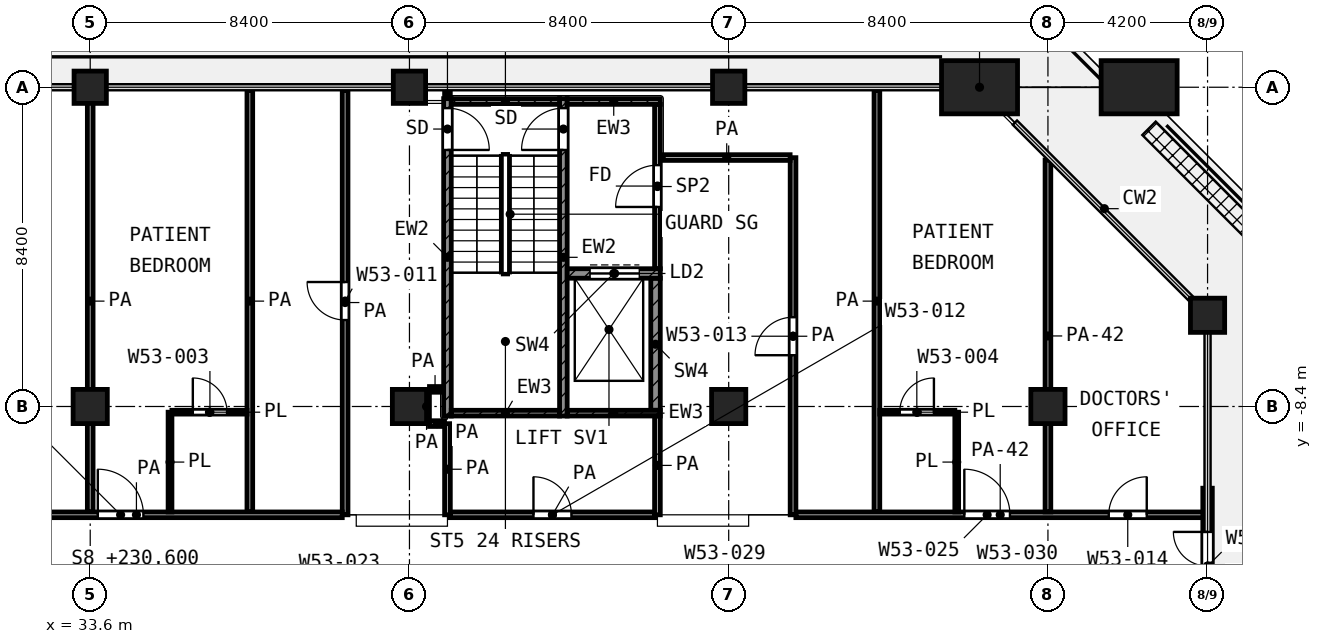
"""IFC4 building model, lengths in metres.
Left out: names, types, materials, properties, quantities, classifications, styles, units other than length and angle.
Written with IfcOpenShell. Run it as: python <this file> out.ifc"""

import sys

from ifc_helpers import new_model, si_unit, direction, frame, frame_2d, origin, origin_2d, place, context, subcontext, project, spatial, rectangle, extrude, element, fill, save


model = new_model("IFC4")
c1 = context("Model", 3, precision=1e-05, world=origin(), true_north=direction((0.0, 1.0)))
c2 = subcontext(c1, "Body", "Model", "MODEL_VIEW")
j1 = project(units=[si_unit("LENGTHUNIT", "METRE"), si_unit("PLANEANGLEUNIT", "RADIAN")], contexts=[c1])
p1 = place(None, origin())
s1 = spatial("IfcSite", under=j1, at=p1, CompositionType="ELEMENT")
p2 = place(p1, origin())
s2 = spatial("IfcBuilding", under=s1, at=p2, CompositionType="ELEMENT")
p3 = place(p2, frame((0.0, 0.0, 230.6)))
s3 = spatial("IfcBuildingStorey", under=s2, at=p3, CompositionType="ELEMENT", Elevation=230.6)
for number, where, z_axis, x_axis in (
    (1, (33.6, 0.0, 0.0), (0.0, 0.0, 1.0), (1.0, 0.0, 0.0)),
    (2, (42.0, 0.0, 0.0), (0.0, 0.0, 1.0), (1.0, 0.0, 0.0)),
    (3, (50.4, 0.0, 0.0), (0.0, 0.0, 1.0), (1.0, 0.0, 0.0)),
):
    element("IfcColumn", number, at=place(p3, frame(where, z_axis=z_axis, x_axis=x_axis)), inside=s3, PredefinedType="COLUMN", context=c2, shape_type="SweptSolid", body=[
        extrude(rectangle(XDim=0.85, YDim=0.85, at=origin_2d()), origin(), (0.0, 0.0, 1.0), 4.2),
    ])
p4 = place(p3, frame((57.0, 0.0, 0.0), z_axis=(0.0, 0.0, 1.0), x_axis=(1.0, 0.0, 0.0)))
e4 = element("IfcColumn", 4, at=p4, inside=s3, PredefinedType="COLUMN", context=c2, shape_type="SweptSolid", body=[
    extrude(rectangle(XDim=2.0, YDim=1.4, at=origin_2d()), origin(), (0.0, 0.0, 1.0), 4.2),
])
for number, where, z_axis, x_axis in (
    (5, (63.0, -6.0, 0.0), (0.0, 0.0, 1.0), (1.0, 0.0, 0.0)),
    (6, (33.6, -8.4, 0.0), (0.0, 0.0, 1.0), (1.0, 0.0, 0.0)),
    (7, (42.0, -8.4, 0.0), (0.0, 0.0, 1.0), (1.0, 0.0, 0.0)),
    (8, (50.4, -8.4, 0.0), (0.0, 0.0, 1.0), (1.0, 0.0, 0.0)),
    (9, (58.8, -8.4, 0.0), (0.0, 0.0, 1.0), (1.0, 0.0, 0.0)),
):
    element("IfcColumn", number, at=place(p3, frame(where, z_axis=z_axis, x_axis=x_axis)), inside=s3, PredefinedType="COLUMN", context=c2, shape_type="SweptSolid", body=[
        extrude(rectangle(XDim=0.9, YDim=0.9, at=origin_2d()), origin(), (0.0, 0.0, 1.0), 4.2),
    ])
p5 = place(p3, frame((61.2, 0.0, 0.0), z_axis=(0.0, 0.0, 1.0), x_axis=(1.0, 0.0, 0.0)))
e10 = element("IfcColumn", 10, at=p5, inside=s3, PredefinedType="COLUMN", context=c2, shape_type="SweptSolid", body=[
    extrude(rectangle(XDim=2.0, YDim=1.4, at=origin_2d()), origin(), (0.0, 0.0, 1.0), 4.2),
])
p6 = place(p3, frame((63.0, -14.65, 0.0), z_axis=(0.0, 0.0, 1.0), x_axis=(0.0, 1.0, 0.0)))
e11 = element("IfcWall", 11, at=p6, inside=s3, PredefinedType="SOLIDWALL", context=c2, shape_type="SweptSolid", body=[
    extrude(rectangle(XDim=4.1, YDim=0.25, at=frame_2d((2.05, 0.0))), origin(), (0.0, 0.0, 1.0), 2.58),
])
p7 = place(p6, frame((1.15, 0.0, 0.0)))
e12 = element("IfcOpeningElement", 12, at=p7, cuts=e11, PredefinedType="OPENING", context=c2, shape_type="SweptSolid", body=[
    extrude(rectangle(XDim=1.8, YDim=2.1, at=frame_2d((0.9, 1.05))), frame((0.0, 0.135, 0.0), z_axis=(0.0, -1.0, 0.0), x_axis=(1.0, 0.0, 0.0)), (0.0, 0.0, 1.0), 0.27),
])
p8 = place(p3, frame((43.0, -8.65, 0.0), z_axis=(0.0, 0.0, 1.0), x_axis=(0.0, 1.0, 0.0)))
e13 = element("IfcWall", 13, at=p8, inside=s3, PredefinedType="SHEAR", context=c2, shape_type="SweptSolid", body=[
    extrude(rectangle(XDim=8.35, YDim=0.2, at=frame_2d((4.175, 0.0))), origin(), (0.0, 0.0, 1.0), 3.6),
])
p9 = place(p8, frame((7.0, 0.0, 0.0)))
e14 = element("IfcOpeningElement", 14, at=p9, cuts=e13, PredefinedType="OPENING", context=c2, shape_type="SweptSolid", body=[
    extrude(rectangle(XDim=1.1, YDim=2.1, at=frame_2d((0.55, 1.05))), frame((0.0, 0.11, 0.0), z_axis=(0.0, -1.0, 0.0), x_axis=(1.0, 0.0, 0.0)), (0.0, 0.0, 1.0), 0.22),
])
p10 = place(p3, frame((46.05, -8.65, 0.0), z_axis=(0.0, 0.0, 1.0), x_axis=(0.0, 1.0, 0.0)))
e15 = element("IfcWall", 15, at=p10, inside=s3, PredefinedType="SHEAR", context=c2, shape_type="SweptSolid", body=[
    extrude(rectangle(XDim=8.35, YDim=0.2, at=frame_2d((4.175, 0.0))), origin(), (0.0, 0.0, 1.0), 3.6),
])
p11 = place(p10, frame((7.0, 0.0, 0.0)))
e16 = element("IfcOpeningElement", 16, at=p11, cuts=e15, PredefinedType="OPENING", context=c2, shape_type="SweptSolid", body=[
    extrude(rectangle(XDim=1.1, YDim=2.1, at=frame_2d((0.55, 1.05))), frame((0.0, 0.11, 0.0), z_axis=(0.0, -1.0, 0.0), x_axis=(1.0, 0.0, 0.0)), (0.0, 0.0, 1.0), 0.22),
])
p12 = place(p3, frame((43.1, -0.375, 0.0), z_axis=(0.0, 0.0, 1.0), x_axis=(1.0, 0.0, 0.0)))
e17 = element("IfcWall", 17, at=p12, inside=s3, PredefinedType="SHEAR", context=c2, shape_type="SweptSolid", body=[
    extrude(rectangle(XDim=2.85, YDim=0.15, at=frame_2d((1.425, 0.0))), origin(), (0.0, 0.0, 1.0), 3.6),
])
p13 = place(p3, frame((46.15, -0.375, 0.0), z_axis=(0.0, 0.0, 1.0), x_axis=(1.0, 0.0, 0.0)))
e18 = element("IfcWall", 18, at=p13, inside=s3, PredefinedType="SHEAR", context=c2, shape_type="SweptSolid", body=[
    extrude(rectangle(XDim=2.45, YDim=0.15, at=frame_2d((1.225, 0.0))), origin(), (0.0, 0.0, 1.0), 3.6),
])
p14 = place(p3, frame((43.1, -8.575, 0.0), z_axis=(0.0, 0.0, 1.0), x_axis=(1.0, 0.0, 0.0)))
e19 = element("IfcWall", 19, at=p14, inside=s3, PredefinedType="SHEAR", context=c2, shape_type="SweptSolid", body=[
    extrude(rectangle(XDim=2.85, YDim=0.15, at=frame_2d((1.425, 0.0))), origin(), (0.0, 0.0, 1.0), 3.6),
])
p15 = place(p3, frame((46.15, -8.575, 0.0), z_axis=(0.0, 0.0, 1.0), x_axis=(1.0, 0.0, 0.0)))
e20 = element("IfcWall", 20, at=p15, inside=s3, PredefinedType="SHEAR", context=c2, shape_type="SweptSolid", body=[
    extrude(rectangle(XDim=2.45, YDim=0.15, at=frame_2d((1.225, 0.0))), origin(), (0.0, 0.0, 1.0), 3.6),
])
p16 = place(p3, frame((46.15, -4.9, 0.0), z_axis=(0.0, 0.0, 1.0), x_axis=(1.0, 0.0, 0.0)))
e21 = element("IfcWall", 21, at=p16, inside=s3, PredefinedType="SHEAR", context=c2, shape_type="SweptSolid", body=[
    extrude(rectangle(XDim=2.45, YDim=0.25, at=frame_2d((1.225, 0.0))), origin(), (0.0, 0.0, 1.0), 3.6),
])
p17 = place(p16, frame((0.6, 0.0, 0.0)))
e22 = element("IfcOpeningElement", 22, at=p17, cuts=e21, PredefinedType="OPENING", context=c2, shape_type="SweptSolid", body=[
    extrude(rectangle(XDim=1.3, YDim=2.1, at=frame_2d((0.65, 1.05))), frame((0.0, 0.135, 0.0), z_axis=(0.0, -1.0, 0.0), x_axis=(1.0, 0.0, 0.0)), (0.0, 0.0, 1.0), 0.27),
])
p18 = place(p3, frame((48.475, -8.5, 0.0), z_axis=(0.0, 0.0, 1.0), x_axis=(0.0, 1.0, 0.0)))
e23 = element("IfcWall", 23, at=p18, inside=s3, PredefinedType="SHEAR", context=c2, shape_type="SweptSolid", body=[
    extrude(rectangle(XDim=3.475, YDim=0.25, at=frame_2d((1.738, 0.0))), origin(), (0.0, 0.0, 1.0), 3.6),
])
p19 = place(p3, frame((48.525, -4.775, 0.0), z_axis=(0.0, 0.0, 1.0), x_axis=(0.0, 1.0, 0.0)))
e24 = element("IfcWall", 24, at=p19, inside=s3, PredefinedType="PARTITIONING", context=c2, shape_type="SweptSolid", body=[
    extrude(rectangle(XDim=4.325, YDim=0.15, at=frame_2d((2.163, 0.0))), origin(), (0.0, 0.0, 1.0), 3.6),
])
p20 = place(p19, frame((1.625, 0.0, 0.0)))
e25 = element("IfcOpeningElement", 25, at=p20, cuts=e24, PredefinedType="OPENING", context=c2, shape_type="SweptSolid", body=[
    extrude(rectangle(XDim=1.1, YDim=2.1, at=frame_2d((0.55, 1.05))), frame((0.0, 0.085, 0.0), z_axis=(0.0, -1.0, 0.0), x_axis=(1.0, 0.0, 0.0)), (0.0, 0.0, 1.0), 0.17),
])
p21 = place(p3, frame((35.75, -8.55, 0.0), z_axis=(0.0, 0.0, 1.0), x_axis=(1.0, 0.0, 0.0)))
e26 = element("IfcWall", 26, at=p21, inside=s3, PredefinedType="PARTITIONING", context=c2, shape_type="SweptSolid", body=[
    extrude(rectangle(XDim=1.975, YDim=0.1, at=frame_2d((0.988, 0.0))), origin(), (0.0, 0.0, 1.0), 3.6),
])
p22 = place(p21, frame((0.55, 0.0, 0.0)))
e27 = element("IfcOpeningElement", 27, at=p22, cuts=e26, PredefinedType="OPENING", context=c2, shape_type="SweptSolid", body=[
    extrude(rectangle(XDim=0.9, YDim=2.1, at=frame_2d((0.45, 1.05))), frame((0.0, 0.06, 0.0), z_axis=(0.0, -1.0, 0.0), x_axis=(1.0, 0.0, 0.0)), (0.0, 0.0, 1.0), 0.12),
])
p23 = place(p3, frame((54.375, -8.55, 0.0), z_axis=(0.0, 0.0, 1.0), x_axis=(1.0, 0.0, 0.0)))
e28 = element("IfcWall", 28, at=p23, inside=s3, PredefinedType="PARTITIONING", context=c2, shape_type="SweptSolid", body=[
    extrude(rectangle(XDim=1.975, YDim=0.1, at=frame_2d((0.988, 0.0))), origin(), (0.0, 0.0, 1.0), 3.6),
])
p24 = place(p23, frame((0.525, 0.0, 0.0)))
e29 = element("IfcOpeningElement", 29, at=p24, cuts=e28, PredefinedType="OPENING", context=c2, shape_type="SweptSolid", body=[
    extrude(rectangle(XDim=0.9, YDim=2.1, at=frame_2d((0.45, 1.05))), frame((0.0, 0.06, 0.0), z_axis=(0.0, -1.0, 0.0), x_axis=(1.0, 0.0, 0.0)), (0.0, 0.0, 1.0), 0.12),
])
for number, where, z_axis, x_axis in (
    (30, (35.7, -11.175, 0.0), (0.0, 0.0, 1.0), (0.0, 1.0, 0.0)),
    (31, (56.4, -11.175, 0.0), (0.0, 0.0, 1.0), (0.0, 1.0, 0.0)),
):
    element("IfcWall", number, at=place(p3, frame(where, z_axis=z_axis, x_axis=x_axis)), inside=s3, PredefinedType="PARTITIONING", context=c2, shape_type="SweptSolid", body=[
        extrude(rectangle(XDim=2.625, YDim=0.1, at=frame_2d((1.312, 0.0))), origin(), (0.0, 0.0, 1.0), 3.6),
    ])
p25 = place(p3, frame((29.4, -11.25, 0.0), z_axis=(0.0, 0.0, 1.0), x_axis=(1.0, 0.0, 0.0)))
e32 = element("IfcWall", 32, at=p25, inside=s3, PredefinedType="PARTITIONING", context=c2, shape_type="SweptSolid", body=[
    extrude(rectangle(XDim=10.832, YDim=0.15, at=frame_2d((5.416, 0.0))), origin(), (0.0, 0.0, 1.0), 3.6),
])
p26 = place(p25, frame((4.4, 0.0, 0.0)))
e33 = element("IfcOpeningElement", 33, at=p26, cuts=e32, PredefinedType="OPENING", context=c2, shape_type="SweptSolid", body=[
    extrude(rectangle(XDim=1.2, YDim=2.1, at=frame_2d((0.6, 1.05))), frame((0.0, 0.085, 0.0), z_axis=(0.0, -1.0, 0.0), x_axis=(1.0, 0.0, 0.0)), (0.0, 0.0, 1.0), 0.17),
])
p27 = place(p25, frame((1.5, 0.0, 0.0)))
e34 = element("IfcOpeningElement", 34, at=p27, cuts=e32, PredefinedType="OPENING", context=c2, shape_type="SweptSolid", body=[
    extrude(rectangle(XDim=1.2, YDim=2.1, at=frame_2d((0.6, 1.05))), frame((0.0, 0.085, 0.0), z_axis=(0.0, -1.0, 0.0), x_axis=(1.0, 0.0, 0.0)), (0.0, 0.0, 1.0), 0.17),
])
p28 = place(p3, frame((43.075, -11.25, 0.0), z_axis=(0.0, 0.0, 1.0), x_axis=(1.0, 0.0, 0.0)))
e35 = element("IfcWall", 35, at=p28, inside=s3, PredefinedType="PARTITIONING", context=c2, shape_type="SweptSolid", body=[
    extrude(rectangle(XDim=5.375, YDim=0.15, at=frame_2d((2.688, 0.0))), origin(), (0.0, 0.0, 1.0), 3.6),
])
p29 = place(p28, frame((2.188, 0.0, 0.0)))
e36 = element("IfcOpeningElement", 36, at=p29, cuts=e35, PredefinedType="OPENING", context=c2, shape_type="SweptSolid", body=[
    extrude(rectangle(XDim=1.0, YDim=2.1, at=frame_2d((0.5, 1.05))), frame((0.0, 0.085, 0.0), z_axis=(0.0, -1.0, 0.0), x_axis=(1.0, 0.0, 0.0)), (0.0, 0.0, 1.0), 0.17),
])
p30 = place(p3, frame((52.168, -11.25, 0.0), z_axis=(0.0, 0.0, 1.0), x_axis=(1.0, 0.0, 0.0)))
e37 = element("IfcWall", 37, at=p30, inside=s3, PredefinedType="PARTITIONING", context=c2, shape_type="SweptSolid", body=[
    extrude(rectangle(XDim=10.752, YDim=0.15, at=frame_2d((5.376, 0.0))), origin(), (0.0, 0.0, 1.0), 2.7),
])
p31 = place(p30, frame((4.432, 0.0, 0.0)))
e38 = element("IfcOpeningElement", 38, at=p31, cuts=e37, PredefinedType="OPENING", context=c2, shape_type="SweptSolid", body=[
    extrude(rectangle(XDim=1.2, YDim=2.1, at=frame_2d((0.6, 1.05))), frame((0.0, 0.085, 0.0), z_axis=(0.0, -1.0, 0.0), x_axis=(1.0, 0.0, 0.0)), (0.0, 0.0, 1.0), 0.17),
])
p32 = place(p30, frame((8.232, 0.0, 0.0)))
e39 = element("IfcOpeningElement", 39, at=p32, cuts=e37, PredefinedType="OPENING", context=c2, shape_type="SweptSolid", body=[
    extrude(rectangle(XDim=1.0, YDim=2.1, at=frame_2d((0.5, 1.05))), frame((0.0, 0.085, 0.0), z_axis=(0.0, -1.0, 0.0), x_axis=(1.0, 0.0, 0.0)), (0.0, 0.0, 1.0), 0.17),
])
p33 = place(p3, frame((42.527, -8.85, 0.0), z_axis=(0.0, 0.0, 1.0), x_axis=(1.0, 0.0, 0.0)))
e40 = element("IfcWall", 40, at=p33, inside=s3, PredefinedType="PARTITIONING", context=c2, shape_type="SweptSolid", body=[
    extrude(rectangle(XDim=0.396, YDim=0.15, at=frame_2d((0.198, 0.0))), origin(), (0.0, 0.0, 1.0), 3.6),
])
p34 = place(p3, frame((42.527, -7.95, 0.0), z_axis=(0.0, 0.0, 1.0), x_axis=(1.0, 0.0, 0.0)))
e41 = element("IfcWall", 41, at=p34, inside=s3, PredefinedType="PARTITIONING", context=c2, shape_type="SweptSolid", body=[
    extrude(rectangle(XDim=0.293, YDim=0.15, at=frame_2d((0.146, 0.0))), origin(), (0.0, 0.0, 1.0), 3.6),
])
p35 = place(p3, frame((48.68, -1.85, 0.0), z_axis=(0.0, 0.0, 1.0), x_axis=(1.0, 0.0, 0.0)))
e42 = element("IfcWall", 42, at=p35, inside=s3, PredefinedType="PARTITIONING", context=c2, shape_type="SweptSolid", body=[
    extrude(rectangle(XDim=3.336, YDim=0.15, at=frame_2d((1.668, 0.0))), origin(), (0.0, 0.0, 1.0), 3.6),
])
for number, where, z_axis, x_axis in (
    (43, (33.6, -11.175, 0.0), (0.0, 0.0, 1.0), (0.0, 1.0, 0.0)),
    (44, (37.8, -11.175, 0.0), (0.0, 0.0, 1.0), (0.0, 1.0, 0.0)),
):
    element("IfcWall", number, at=place(p3, frame(where, z_axis=z_axis, x_axis=x_axis)), inside=s3, PredefinedType="PARTITIONING", context=c2, shape_type="SweptSolid", body=[
        extrude(rectangle(XDim=11.095, YDim=0.15, at=frame_2d((5.547, 0.0))), origin(), (0.0, 0.0, 1.0), 3.6),
    ])
p36 = place(p3, frame((40.307, -11.25, 0.0), z_axis=(0.0, 0.0, 1.0), x_axis=(0.0, 1.0, 0.0)))
e45 = element("IfcWall", 45, at=p36, inside=s3, PredefinedType="PARTITIONING", context=c2, shape_type="SweptSolid", body=[
    extrude(rectangle(XDim=11.17, YDim=0.15, at=frame_2d((5.585, 0.0))), origin(), (0.0, 0.0, 1.0), 3.6),
])
p37 = place(p36, frame((5.125, 0.0, 0.0)))
e46 = element("IfcOpeningElement", 46, at=p37, cuts=e45, PredefinedType="OPENING", context=c2, shape_type="SweptSolid", body=[
    extrude(rectangle(XDim=1.0, YDim=2.1, at=frame_2d((0.5, 1.05))), frame((0.0, 0.085, 0.0), z_axis=(0.0, -1.0, 0.0), x_axis=(1.0, 0.0, 0.0)), (0.0, 0.0, 1.0), 0.17),
])
p38 = place(p3, frame((42.45, -8.849, 0.0), z_axis=(0.0, 0.0, 1.0), x_axis=(0.0, 1.0, 0.0)))
e47 = element("IfcWall", 47, at=p38, inside=s3, PredefinedType="PARTITIONING", context=c2, shape_type="SweptSolid", body=[
    extrude(rectangle(XDim=0.897, YDim=0.15, at=frame_2d((0.449, 0.0))), origin(), (0.0, 0.0, 1.0), 3.6),
])
p39 = place(p3, frame((43.0, -11.25, 0.0), z_axis=(0.0, 0.0, 1.0), x_axis=(0.0, 1.0, 0.0)))
e48 = element("IfcWall", 48, at=p39, inside=s3, PredefinedType="PARTITIONING", context=c2, shape_type="SweptSolid", body=[
    extrude(rectangle(XDim=2.398, YDim=0.15, at=frame_2d((1.199, 0.0))), origin(), (0.0, 0.0, 1.0), 3.6),
])
p40 = place(p3, frame((43.0, -0.27, 0.0), z_axis=(0.0, 0.0, 1.0), x_axis=(0.0, 1.0, 0.0)))
e49 = element("IfcWall", 49, at=p40, inside=s3, PredefinedType="PARTITIONING", context=c2, shape_type="SweptSolid", body=[
    extrude(rectangle(XDim=0.19, YDim=0.15, at=frame_2d((0.095, 0.0))), origin(), (0.0, 0.0, 1.0), 3.6),
])
p41 = place(p3, frame((48.525, -11.25, 0.0), z_axis=(0.0, 0.0, 1.0), x_axis=(0.0, 1.0, 0.0)))
e50 = element("IfcWall", 50, at=p41, inside=s3, PredefinedType="PARTITIONING", context=c2, shape_type="SweptSolid", body=[
    extrude(rectangle(XDim=2.6, YDim=0.15, at=frame_2d((1.3, 0.0))), origin(), (0.0, 0.0, 1.0), 3.6),
])
p42 = place(p3, frame((52.093, -11.25, 0.0), z_axis=(0.0, 0.0, 1.0), x_axis=(0.0, 1.0, 0.0)))
e51 = element("IfcWall", 51, at=p42, inside=s3, PredefinedType="PARTITIONING", context=c2, shape_type="SweptSolid", body=[
    extrude(rectangle(XDim=9.397, YDim=0.15, at=frame_2d((4.698, 0.0))), origin(), (0.0, 0.0, 1.0), 3.6),
])
p43 = place(p42, frame((4.199, 0.0, 0.0)))
e52 = element("IfcOpeningElement", 52, at=p43, cuts=e51, PredefinedType="OPENING", context=c2, shape_type="SweptSolid", body=[
    extrude(rectangle(XDim=1.0, YDim=2.1, at=frame_2d((0.5, 1.05))), frame((0.0, 0.085, 0.0), z_axis=(0.0, -1.0, 0.0), x_axis=(1.0, 0.0, 0.0)), (0.0, 0.0, 1.0), 0.17),
])
p44 = place(p3, frame((54.3, -11.175, 0.0), z_axis=(0.0, 0.0, 1.0), x_axis=(0.0, 1.0, 0.0)))
e53 = element("IfcWall", 53, at=p44, inside=s3, PredefinedType="PARTITIONING", context=c2, shape_type="SweptSolid", body=[
    extrude(rectangle(XDim=11.095, YDim=0.15, at=frame_2d((5.547, 0.0))), origin(), (0.0, 0.0, 1.0), 3.6),
])
p45 = place(p3, frame((58.8, -11.175, 0.0), z_axis=(0.0, 0.0, 1.0), x_axis=(0.0, 1.0, 0.0)))
e54 = element("IfcWall", 54, at=p45, inside=s3, PredefinedType="PARTITIONING", context=c2, shape_type="SweptSolid", body=[
    extrude(rectangle(XDim=9.262, YDim=0.15, at=frame_2d((4.631, 0.0))), origin(), (0.0, 0.0, 1.0), 2.7),
])
p46 = place(p7, origin())
e55 = element("IfcDoor", 55, at=p46, inside=s3, OperationType="DOUBLE_DOOR_SINGLE_SWING", PredefinedType="DOOR", context=c2, shape_type="SweptSolid", body=[
    extrude(rectangle(XDim=1.8, YDim=2.1, at=frame_2d((0.9, 1.05))), frame((0.0, 0.025, 0.0), z_axis=(0.0, -1.0, 0.0), x_axis=(1.0, 0.0, 0.0)), (0.0, 0.0, 1.0), 0.05),
])
fill(e12, e55)
p47 = place(p9, frame((1.1, 0.0, 0.0), z_axis=(0.0, 0.0, 1.0), x_axis=(-1.0, 0.0, 0.0)))
e56 = element("IfcDoor", 56, at=p47, inside=s3, OperationType="SINGLE_SWING_LEFT", PredefinedType="DOOR", context=c2, shape_type="SweptSolid", body=[
    extrude(rectangle(XDim=1.1, YDim=2.1, at=frame_2d((0.55, 1.05))), frame((0.0, 0.025, 0.0), z_axis=(0.0, -1.0, 0.0), x_axis=(1.0, 0.0, 0.0)), (0.0, 0.0, 1.0), 0.05),
])
fill(e14, e56)
p48 = place(p11, origin())
e57 = element("IfcDoor", 57, at=p48, inside=s3, OperationType="SINGLE_SWING_LEFT", PredefinedType="DOOR", context=c2, shape_type="SweptSolid", body=[
    extrude(rectangle(XDim=1.1, YDim=2.1, at=frame_2d((0.55, 1.05))), frame((0.0, 0.025, 0.0), z_axis=(0.0, -1.0, 0.0), x_axis=(1.0, 0.0, 0.0)), (0.0, 0.0, 1.0), 0.05),
])
fill(e16, e57)
p49 = place(p17, origin())
e58 = element("IfcDoor", 58, at=p49, inside=s3, OperationType="DOUBLE_DOOR_SLIDING", PredefinedType="DOOR", context=c2, shape_type="SweptSolid", body=[
    extrude(rectangle(XDim=1.3, YDim=2.1, at=frame_2d((0.65, 1.05))), frame((0.0, 0.025, 0.0), z_axis=(0.0, -1.0, 0.0), x_axis=(1.0, 0.0, 0.0)), (0.0, 0.0, 1.0), 0.05),
])
fill(e22, e58)
p50 = place(p20, origin())
e59 = element("IfcDoor", 59, at=p50, inside=s3, OperationType="SINGLE_SWING_LEFT", PredefinedType="DOOR", context=c2, shape_type="SweptSolid", body=[
    extrude(rectangle(XDim=1.1, YDim=2.1, at=frame_2d((0.55, 1.05))), frame((0.0, 0.025, 0.0), z_axis=(0.0, -1.0, 0.0), x_axis=(1.0, 0.0, 0.0)), (0.0, 0.0, 1.0), 0.05),
])
fill(e25, e59)
p51 = place(p26, origin())
e60 = element("IfcDoor", 60, at=p51, inside=s3, OperationType="SINGLE_SWING_LEFT", PredefinedType="DOOR", context=c2, shape_type="SweptSolid", body=[
    extrude(rectangle(XDim=1.2, YDim=2.1, at=frame_2d((0.6, 1.05))), frame((0.0, 0.025, 0.0), z_axis=(0.0, -1.0, 0.0), x_axis=(1.0, 0.0, 0.0)), (0.0, 0.0, 1.0), 0.05),
])
fill(e33, e60)
p52 = place(p22, origin())
e61 = element("IfcDoor", 61, at=p52, inside=s3, OperationType="SINGLE_SWING_LEFT", PredefinedType="DOOR", context=c2, shape_type="SweptSolid", body=[
    extrude(rectangle(XDim=0.9, YDim=2.1, at=frame_2d((0.45, 1.05))), frame((0.0, 0.025, 0.0), z_axis=(0.0, -1.0, 0.0), x_axis=(1.0, 0.0, 0.0)), (0.0, 0.0, 1.0), 0.05),
])
fill(e27, e61)
p53 = place(p37, origin())
e62 = element("IfcDoor", 62, at=p53, inside=s3, OperationType="SINGLE_SWING_RIGHT", PredefinedType="DOOR", context=c2, shape_type="SweptSolid", body=[
    extrude(rectangle(XDim=1.0, YDim=2.1, at=frame_2d((0.5, 1.05))), frame((0.0, 0.025, 0.0), z_axis=(0.0, -1.0, 0.0), x_axis=(1.0, 0.0, 0.0)), (0.0, 0.0, 1.0), 0.05),
])
fill(e46, e62)
p54 = place(p29, origin())
e63 = element("IfcDoor", 63, at=p54, inside=s3, OperationType="SINGLE_SWING_LEFT", PredefinedType="DOOR", context=c2, shape_type="SweptSolid", body=[
    extrude(rectangle(XDim=1.0, YDim=2.1, at=frame_2d((0.5, 1.05))), frame((0.0, 0.025, 0.0), z_axis=(0.0, -1.0, 0.0), x_axis=(1.0, 0.0, 0.0)), (0.0, 0.0, 1.0), 0.05),
])
fill(e36, e63)
p55 = place(p43, origin())
e64 = element("IfcDoor", 64, at=p55, inside=s3, OperationType="SINGLE_SWING_LEFT", PredefinedType="DOOR", context=c2, shape_type="SweptSolid", body=[
    extrude(rectangle(XDim=1.0, YDim=2.1, at=frame_2d((0.5, 1.05))), frame((0.0, 0.025, 0.0), z_axis=(0.0, -1.0, 0.0), x_axis=(1.0, 0.0, 0.0)), (0.0, 0.0, 1.0), 0.05),
])
fill(e52, e64)
p56 = place(p31, origin())
e65 = element("IfcDoor", 65, at=p56, inside=s3, OperationType="SINGLE_SWING_LEFT", PredefinedType="DOOR", context=c2, shape_type="SweptSolid", body=[
    extrude(rectangle(XDim=1.2, YDim=2.1, at=frame_2d((0.6, 1.05))), frame((0.0, 0.025, 0.0), z_axis=(0.0, -1.0, 0.0), x_axis=(1.0, 0.0, 0.0)), (0.0, 0.0, 1.0), 0.05),
])
fill(e38, e65)
p57 = place(p24, origin())
e66 = element("IfcDoor", 66, at=p57, inside=s3, OperationType="SINGLE_SWING_RIGHT", PredefinedType="DOOR", context=c2, shape_type="SweptSolid", body=[
    extrude(rectangle(XDim=0.9, YDim=2.1, at=frame_2d((0.45, 1.05))), frame((0.0, 0.025, 0.0), z_axis=(0.0, -1.0, 0.0), x_axis=(1.0, 0.0, 0.0)), (0.0, 0.0, 1.0), 0.05),
])
fill(e29, e66)
p58 = place(p32, origin())
e67 = element("IfcDoor", 67, at=p58, inside=s3, OperationType="SINGLE_SWING_RIGHT", PredefinedType="DOOR", context=c2, shape_type="SweptSolid", body=[
    extrude(rectangle(XDim=1.0, YDim=2.1, at=frame_2d((0.5, 1.05))), frame((0.0, 0.025, 0.0), z_axis=(0.0, -1.0, 0.0), x_axis=(1.0, 0.0, 0.0)), (0.0, 0.0, 1.0), 0.05),
])
fill(e39, e67)
save(model, sys.argv[1])
